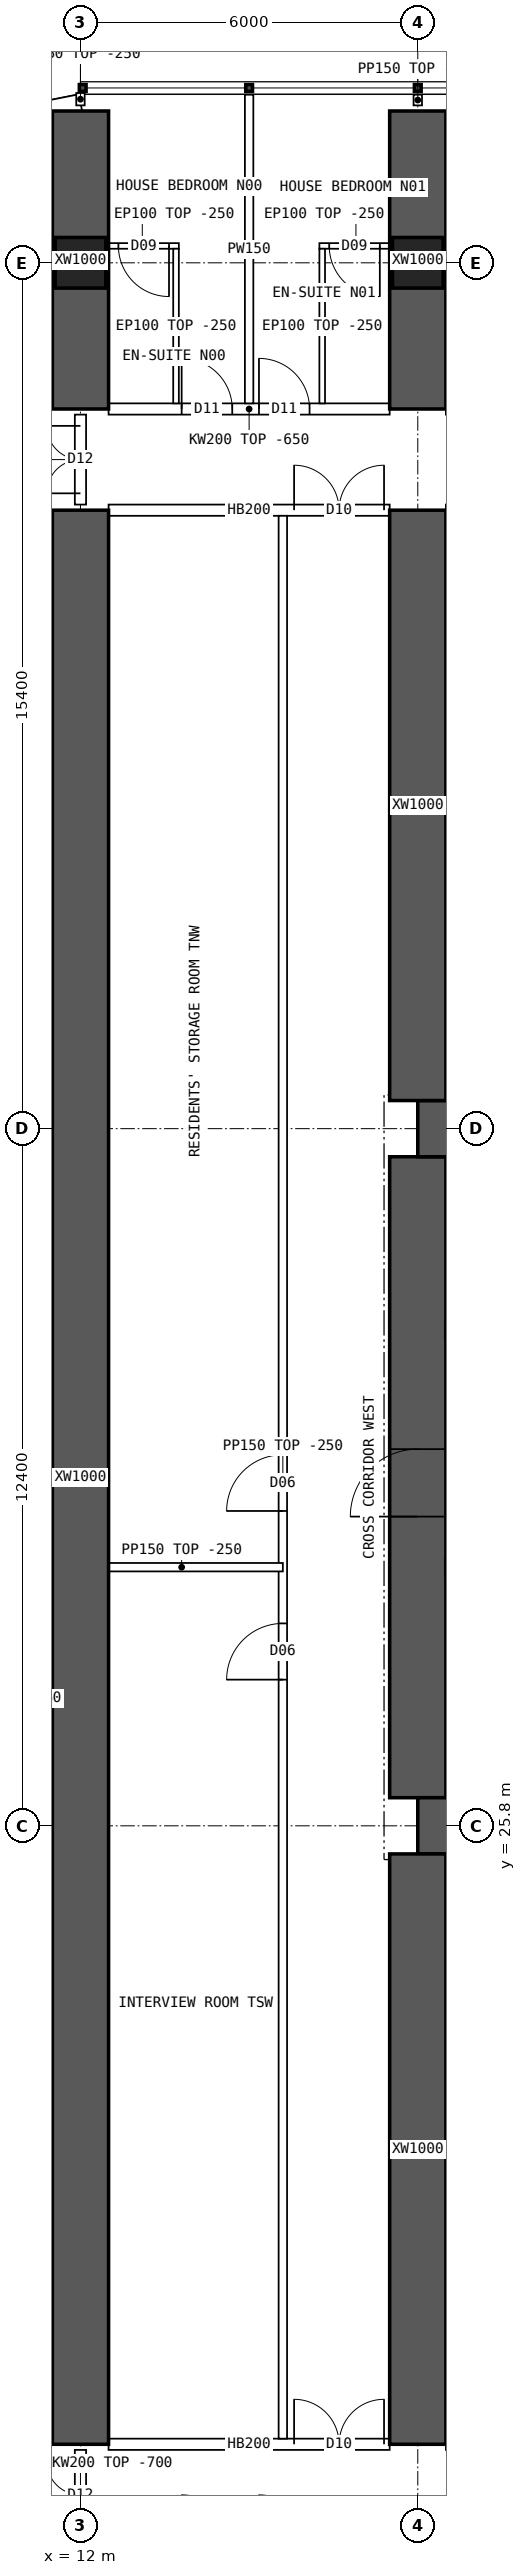
"""IFC4 building model, lengths in metres.
Left out: names, types, materials, properties, quantities, classifications, styles, units other than length and angle.
Written with IfcOpenShell. Run it as: python <this file> out.ifc"""

import sys

from ifc_helpers import new_model, si_unit, direction, frame, frame_2d, origin, origin_2d, place, context, subcontext, project, spatial, polyline, rectangle, hollow_rectangle, outline, extrude, element, fill, save


model = new_model("IFC4")
c1 = context("Model", 3, precision=1e-05, world=origin(), true_north=direction((0.0, 1.0)))
c2 = subcontext(c1, "Body", "Model", "MODEL_VIEW")
j1 = project(units=[si_unit("LENGTHUNIT", "METRE"), si_unit("PLANEANGLEUNIT", "RADIAN")], contexts=[c1])
p1 = place(None, origin())
s1 = spatial("IfcSite", under=j1, at=p1, CompositionType="ELEMENT")
p2 = place(p1, origin())
s2 = spatial("IfcBuilding", under=s1, at=p2, CompositionType="ELEMENT")
p3 = place(p2, frame((0.0, 0.0, 46.45)))
s3 = spatial("IfcBuildingStorey", under=s2, at=p3, CompositionType="ELEMENT", Elevation=46.45)
for number, where, z_axis, x_axis in (
    (1, (12.0, 53.6, 0.0), (0.0, 0.0, 1.0), (1.0, 0.0, 0.0)),
    (2, (18.0, 53.6, 0.0), (0.0, 0.0, 1.0), (1.0, 0.0, 0.0)),
):
    element("IfcColumn", number, at=place(p3, frame(where, z_axis=z_axis, x_axis=x_axis)), inside=s3, PredefinedType="COLUMN", context=c2, shape_type="SweptSolid", body=[
        extrude(hollow_rectangle(XDim=0.9, YDim=0.9, WallThickness=0.09, at=origin_2d()), origin(), (0.0, 0.0, 1.0), 3.75),
    ])
for number, where, z_axis, x_axis in (
    (3, (18.0, 25.8, 0.0), (0.0, 0.0, 1.0), (1.0, 0.0, 0.0)),
    (4, (18.0, 38.2, 0.0), (0.0, 0.0, 1.0), (1.0, 0.0, 0.0)),
):
    element("IfcWall", number, at=place(p3, frame(where, z_axis=z_axis, x_axis=x_axis)), inside=s3, PredefinedType="SHEAR", context=c2, shape_type="SweptSolid", body=[
        extrude(rectangle(XDim=48.0, YDim=1.0, at=frame_2d((24.0, 0.0))), origin(), (0.0, 0.0, 1.0), 3.75),
    ])
p4 = place(p3, frame((18.0, 26.3, 0.0), z_axis=(0.0, 0.0, 1.0), x_axis=(0.0, 1.0, 0.0)))
e5 = element("IfcWall", 5, at=p4, inside=s3, PredefinedType="SHEAR", context=c2, shape_type="SweptSolid", body=[
    extrude(rectangle(XDim=11.4, YDim=1.0, at=frame_2d((5.7, 0.0))), origin(), (0.0, 0.0, 1.0), 3.75),
])
p5 = place(p4, frame((5.0, 0.0, 0.0)))
e6 = element("IfcOpeningElement", 6, at=p5, cuts=e5, PredefinedType="OPENING", context=c2, shape_type="SweptSolid", body=[
    extrude(rectangle(XDim=1.2, YDim=2.1, at=frame_2d((0.6, 1.05))), frame((0.0, 0.51, 0.0), z_axis=(0.0, -1.0, 0.0), x_axis=(1.0, 0.0, 0.0)), (0.0, 0.0, 1.0), 1.02),
])
p6 = place(p3, frame((12.0, 51.0, 0.0), z_axis=(0.0, 0.0, 1.0), x_axis=(0.0, 1.0, 0.0)))
e7 = element("IfcWall", 7, at=p6, inside=s3, PredefinedType="SHEAR", context=c2, shape_type="SweptSolid", body=[
    extrude(rectangle(XDim=5.3, YDim=1.0, at=frame_2d((2.65, 0.0))), origin(), (0.0, 0.0, 1.0), 3.75),
])
p7 = place(p3, frame((12.0, 14.8, 0.0), z_axis=(0.0, 0.0, 1.0), x_axis=(0.0, 1.0, 0.0)))
e8 = element("IfcWall", 8, at=p7, inside=s3, PredefinedType="SHEAR", context=c2, shape_type="SweptSolid", body=[
    extrude(rectangle(XDim=34.4, YDim=1.0, at=frame_2d((17.2, 0.0))), origin(), (0.0, 0.0, 1.0), 3.75),
])
p8 = place(p3, frame((18.0, 51.0, 0.0), z_axis=(0.0, 0.0, 1.0), x_axis=(0.0, 1.0, 0.0)))
e9 = element("IfcWall", 9, at=p8, inside=s3, PredefinedType="SHEAR", context=c2, shape_type="SweptSolid", body=[
    extrude(rectangle(XDim=5.3, YDim=1.0, at=frame_2d((2.65, 0.0))), origin(), (0.0, 0.0, 1.0), 3.75),
])
for number, where, z_axis, x_axis in (
    (10, (18.0, 14.8, 0.0), (0.0, 0.0, 1.0), (0.0, 1.0, 0.0)),
    (11, (18.0, 38.7, 0.0), (0.0, 0.0, 1.0), (0.0, 1.0, 0.0)),
):
    element("IfcWall", number, at=place(p3, frame(where, z_axis=z_axis, x_axis=x_axis)), inside=s3, PredefinedType="SHEAR", context=c2, shape_type="SweptSolid", body=[
        extrude(rectangle(XDim=10.5, YDim=1.0, at=frame_2d((5.25, 0.0))), origin(), (0.0, 0.0, 1.0), 3.75),
    ])
p9 = place(p3, frame((12.0, 56.45, 0.0), z_axis=(0.0, 0.0, 1.0), x_axis=(-0.980787251524, -0.195080412259, 0.0)))
e12 = element("IfcWall", 12, at=p9, inside=s3, PredefinedType="SOLIDWALL", context=c2, shape_type="SweptSolid", body=[
    extrude(outline(polyline([(-0.03, -0.15), (3.249, -0.15), (3.189, 0.15), (0.03, 0.15), (-0.03, -0.15)])), origin(), (0.0, 0.0, 1.0), 3.5),
])
p10 = place(p9, frame((0.909, 0.0, 0.9)))
e13 = element("IfcOpeningElement", 13, at=p10, cuts=e12, PredefinedType="OPENING", context=c2, shape_type="SweptSolid", body=[
    extrude(rectangle(XDim=1.4, YDim=1.8, at=frame_2d((0.7, 0.9))), frame((0.0, 0.16, 0.0), z_axis=(0.0, -1.0, 0.0), x_axis=(1.0, 0.0, 0.0)), (0.0, 0.0, 1.0), 0.32),
])
p11 = place(p3, frame((12.5, 14.8, 0.0), z_axis=(0.0, 0.0, 1.0), x_axis=(1.0, 0.0, 0.0)))
e14 = element("IfcWall", 14, at=p11, inside=s3, PredefinedType="SOLIDWALL", context=c2, shape_type="SweptSolid", body=[
    extrude(rectangle(XDim=5.0, YDim=0.2, at=frame_2d((2.5, 0.0))), origin(), (0.0, 0.0, 1.0), 3.5),
])
p12 = place(p11, frame((3.3, 0.0, 0.0)))
e15 = element("IfcOpeningElement", 15, at=p12, cuts=e14, PredefinedType="OPENING", context=c2, shape_type="SweptSolid", body=[
    extrude(rectangle(XDim=1.6, YDim=2.1, at=frame_2d((0.8, 1.05))), frame((0.0, 0.11, 0.0), z_axis=(0.0, -1.0, 0.0), x_axis=(1.0, 0.0, 0.0)), (0.0, 0.0, 1.0), 0.22),
])
p13 = place(p3, frame((12.5, 51.0, 0.0), z_axis=(0.0, 0.0, 1.0), x_axis=(1.0, 0.0, 0.0)))
e16 = element("IfcWall", 16, at=p13, inside=s3, PredefinedType="SOLIDWALL", context=c2, shape_type="SweptSolid", body=[
    extrude(outline(polyline([(0.0, 0.0), (5.0, 0.0), (5.0, 3.1), (0.0, 3.1), (0.0, 0.0)])), frame((0.0, 0.1, 0.0), z_axis=(0.0, -1.0, 0.0), x_axis=(1.0, 0.0, 0.0)), (0.0, 0.0, 1.0), 0.2),
])
p14 = place(p13, frame((1.3, 0.0, 0.0)))
e17 = element("IfcOpeningElement", 17, at=p14, cuts=e16, PredefinedType="OPENING", context=c2, shape_type="SweptSolid", body=[
    extrude(rectangle(XDim=0.9, YDim=2.1, at=frame_2d((0.45, 1.05))), frame((0.0, 0.11, 0.0), z_axis=(0.0, -1.0, 0.0), x_axis=(1.0, 0.0, 0.0)), (0.0, 0.0, 1.0), 0.22),
])
p15 = place(p13, frame((2.675, 0.0, 0.0)))
e18 = element("IfcOpeningElement", 18, at=p15, cuts=e16, PredefinedType="OPENING", context=c2, shape_type="SweptSolid", body=[
    extrude(rectangle(XDim=0.9, YDim=2.1, at=frame_2d((0.45, 1.05))), frame((0.0, 0.11, 0.0), z_axis=(0.0, -1.0, 0.0), x_axis=(1.0, 0.0, 0.0)), (0.0, 0.0, 1.0), 0.22),
])
p16 = place(p3, frame((12.5, 49.2, 0.0), z_axis=(0.0, 0.0, 1.0), x_axis=(1.0, 0.0, 0.0)))
e19 = element("IfcWall", 19, at=p16, inside=s3, PredefinedType="SOLIDWALL", context=c2, shape_type="SweptSolid", body=[
    extrude(rectangle(XDim=5.0, YDim=0.2, at=frame_2d((2.5, 0.0))), origin(), (0.0, 0.0, 1.0), 3.5),
])
p17 = place(p16, frame((3.3, 0.0, 0.0)))
e20 = element("IfcOpeningElement", 20, at=p17, cuts=e19, PredefinedType="OPENING", context=c2, shape_type="SweptSolid", body=[
    extrude(rectangle(XDim=1.6, YDim=2.1, at=frame_2d((0.8, 1.05))), frame((0.0, 0.11, 0.0), z_axis=(0.0, -1.0, 0.0), x_axis=(1.0, 0.0, 0.0)), (0.0, 0.0, 1.0), 0.22),
])
p18 = place(p3, frame((15.0, 56.59, 0.0), z_axis=(0.0, 0.0, 1.0), x_axis=(0.0, -1.0, 0.0)))
e21 = element("IfcWall", 21, at=p18, inside=s3, PredefinedType="PARTITIONING", context=c2, shape_type="SweptSolid", body=[
    extrude(outline(polyline([(0.0, 0.0), (5.49, 0.0), (5.49, 3.1), (5.442, 3.1), (5.44, 3.5), (3.192, 3.5), (3.19, 3.1), (2.792, 3.1), (2.79, 3.5), (0.0, 3.5), (0.0, 0.0)])), frame((0.0, 0.075, 0.0), z_axis=(0.0, -1.0, 0.0), x_axis=(1.0, 0.0, 0.0)), (0.0, 0.0, 1.0), 0.15),
])
p19 = place(p3, frame((12.45, 53.9, 0.0), z_axis=(0.0, 0.0, 1.0), x_axis=(1.0, 0.0, 0.0)))
e22 = element("IfcWall", 22, at=p19, inside=s3, PredefinedType="PARTITIONING", context=c2, shape_type="SweptSolid", body=[
    extrude(rectangle(XDim=1.3, YDim=0.1, at=frame_2d((0.65, 0.0))), origin(), (0.0, 0.0, 1.0), 3.5),
])
p20 = place(p19, frame((0.225, 0.0, 0.0)))
e23 = element("IfcOpeningElement", 23, at=p20, cuts=e22, PredefinedType="OPENING", context=c2, shape_type="SweptSolid", body=[
    extrude(rectangle(XDim=0.9, YDim=2.1, at=frame_2d((0.45, 1.05))), frame((0.0, 0.06, 0.0), z_axis=(0.0, -1.0, 0.0), x_axis=(1.0, 0.0, 0.0)), (0.0, 0.0, 1.0), 0.12),
])
p21 = place(p3, frame((13.7, 53.85, 0.0), z_axis=(0.0, 0.0, 1.0), x_axis=(0.0, -1.0, 0.0)))
e24 = element("IfcWall", 24, at=p21, inside=s3, PredefinedType="PARTITIONING", context=c2, shape_type="SweptSolid", body=[
    extrude(outline(polyline([(0.0, 0.0), (2.75, 0.0), (2.75, 3.1), (2.702, 3.1), (2.7, 3.5), (0.452, 3.5), (0.45, 3.1), (0.0, 3.1), (0.0, 0.0)])), frame((0.0, 0.05, 0.0), z_axis=(0.0, -1.0, 0.0), x_axis=(1.0, 0.0, 0.0)), (0.0, 0.0, 1.0), 0.1),
])
p22 = place(p3, frame((16.25, 53.9, 0.0), z_axis=(0.0, 0.0, 1.0), x_axis=(1.0, 0.0, 0.0)))
e25 = element("IfcWall", 25, at=p22, inside=s3, PredefinedType="PARTITIONING", context=c2, shape_type="SweptSolid", body=[
    extrude(rectangle(XDim=1.3, YDim=0.1, at=frame_2d((0.65, 0.0))), origin(), (0.0, 0.0, 1.0), 3.5),
])
p23 = place(p22, frame((0.175, 0.0, 0.0)))
e26 = element("IfcOpeningElement", 26, at=p23, cuts=e25, PredefinedType="OPENING", context=c2, shape_type="SweptSolid", body=[
    extrude(rectangle(XDim=0.9, YDim=2.1, at=frame_2d((0.45, 1.05))), frame((0.0, 0.06, 0.0), z_axis=(0.0, -1.0, 0.0), x_axis=(1.0, 0.0, 0.0)), (0.0, 0.0, 1.0), 0.12),
])
p24 = place(p3, frame((16.3, 53.85, 0.0), z_axis=(0.0, 0.0, 1.0), x_axis=(0.0, -1.0, 0.0)))
e27 = element("IfcWall", 27, at=p24, inside=s3, PredefinedType="PARTITIONING", context=c2, shape_type="SweptSolid", body=[
    extrude(outline(polyline([(0.0, 0.0), (2.75, 0.0), (2.75, 3.1), (2.702, 3.1), (2.7, 3.5), (0.452, 3.5), (0.45, 3.1), (0.0, 3.1), (0.0, 0.0)])), frame((0.0, 0.05, 0.0), z_axis=(0.0, -1.0, 0.0), x_axis=(1.0, 0.0, 0.0)), (0.0, 0.0, 1.0), 0.1),
])
p25 = place(p3, frame((15.6, 14.9, 0.0), z_axis=(0.0, 0.0, 1.0), x_axis=(0.0, 1.0, 0.0)))
e28 = element("IfcWall", 28, at=p25, inside=s3, PredefinedType="PARTITIONING", context=c2, shape_type="SweptSolid", body=[
    extrude(rectangle(XDim=34.2, YDim=0.15, at=frame_2d((17.1, 0.0))), origin(), (0.0, 0.0, 1.0), 3.5),
])
p26 = place(p25, frame((13.5, 0.0, 0.0)))
e29 = element("IfcOpeningElement", 29, at=p26, cuts=e28, PredefinedType="OPENING", context=c2, shape_type="SweptSolid", body=[
    extrude(rectangle(XDim=1.0, YDim=2.1, at=frame_2d((0.5, 1.05))), frame((0.0, 0.085, 0.0), z_axis=(0.0, -1.0, 0.0), x_axis=(1.0, 0.0, 0.0)), (0.0, 0.0, 1.0), 0.17),
])
p27 = place(p25, frame((16.5, 0.0, 0.0)))
e30 = element("IfcOpeningElement", 30, at=p27, cuts=e28, PredefinedType="OPENING", context=c2, shape_type="SweptSolid", body=[
    extrude(rectangle(XDim=1.0, YDim=2.1, at=frame_2d((0.5, 1.05))), frame((0.0, 0.085, 0.0), z_axis=(0.0, -1.0, 0.0), x_axis=(1.0, 0.0, 0.0)), (0.0, 0.0, 1.0), 0.17),
])
p28 = place(p3, frame((12.0, 30.4, 0.0), z_axis=(0.0, 0.0, 1.0), x_axis=(1.0, 0.0, 0.0)))
e31 = element("IfcWall", 31, at=p28, inside=s3, PredefinedType="PARTITIONING", context=c2, shape_type="SweptSolid", body=[
    extrude(rectangle(XDim=3.6, YDim=0.15, at=frame_2d((1.8, 0.0))), origin(), (0.0, 0.0, 1.0), 3.5),
])
p29 = place(p3, frame((3.905, 30.85, 0.0), z_axis=(0.0, 0.0, 1.0), x_axis=(1.0, 0.0, 0.0)))
e32 = element("IfcWall", 32, at=p29, inside=s3, PredefinedType="PARTITIONING", context=c2, shape_type="SweptSolid", body=[
    extrude(outline(polyline([(0.0, 0.0), (8.02, 0.0), (8.02, 3.5), (2.397, 3.5), (2.395, 3.05), (1.797, 3.05), (1.795, 3.5), (0.0, 3.5), (0.0, 0.0)])), frame((0.0, 0.075, 0.0), z_axis=(0.0, -1.0, 0.0), x_axis=(1.0, 0.0, 0.0)), (0.0, 0.0, 1.0), 0.15),
])
p30 = place(p3, frame((12.0, 13.1, 0.0), z_axis=(0.0, 0.0, 1.0), x_axis=(0.0, 1.0, 0.0)))
e33 = element("IfcWall", 33, at=p30, inside=s3, PredefinedType="SOLIDWALL", context=c2, shape_type="SweptSolid", body=[
    extrude(outline(polyline([(0.0, 0.0), (1.6, 0.0), (1.6, 3.05), (0.0, 3.05), (0.0, 0.0)])), frame((0.0, 0.1, 0.0), z_axis=(0.0, -1.0, 0.0), x_axis=(1.0, 0.0, 0.0)), (0.0, 0.0, 1.0), 0.2),
])
p31 = place(p30, frame((0.2, 0.0, 0.0)))
e34 = element("IfcOpeningElement", 34, at=p31, cuts=e33, PredefinedType="OPENING", context=c2, shape_type="SweptSolid", body=[
    extrude(rectangle(XDim=1.2, YDim=2.1, at=frame_2d((0.6, 1.05))), frame((0.0, 0.11, 0.0), z_axis=(0.0, -1.0, 0.0), x_axis=(1.0, 0.0, 0.0)), (0.0, 0.0, 1.0), 0.22),
])
p32 = place(p3, frame((12.0, 49.3, 0.0), z_axis=(0.0, 0.0, 1.0), x_axis=(0.0, 1.0, 0.0)))
e35 = element("IfcWall", 35, at=p32, inside=s3, PredefinedType="SOLIDWALL", context=c2, shape_type="SweptSolid", body=[
    extrude(outline(polyline([(0.0, 0.0), (1.6, 0.0), (1.6, 3.05), (0.0, 3.05), (0.0, 0.0)])), frame((0.0, 0.1, 0.0), z_axis=(0.0, -1.0, 0.0), x_axis=(1.0, 0.0, 0.0)), (0.0, 0.0, 1.0), 0.2),
])
p33 = place(p32, frame((0.2, 0.0, 0.0)))
e36 = element("IfcOpeningElement", 36, at=p33, cuts=e35, PredefinedType="OPENING", context=c2, shape_type="SweptSolid", body=[
    extrude(rectangle(XDim=1.2, YDim=2.1, at=frame_2d((0.6, 1.05))), frame((0.0, 0.11, 0.0), z_axis=(0.0, -1.0, 0.0), x_axis=(1.0, 0.0, 0.0)), (0.0, 0.0, 1.0), 0.22),
])
p34 = place(p3, frame((12.0, 56.4, 0.0), z_axis=(0.0, 0.0, 1.0), x_axis=(0.0, 1.0, 0.0)))
e37 = element("IfcWall", 37, at=p34, inside=s3, PredefinedType="PARTITIONING", context=c2, shape_type="SweptSolid", body=[
    extrude(rectangle(XDim=0.22, YDim=0.15, at=frame_2d((0.11, 0.0))), origin(), (0.0, 0.0, 1.0), 3.5),
])
p35 = place(p3, frame((18.0, 56.4, 0.0), z_axis=(0.0, 0.0, 1.0), x_axis=(0.0, 1.0, 0.0)))
e38 = element("IfcWall", 38, at=p35, inside=s3, PredefinedType="PARTITIONING", context=c2, shape_type="SweptSolid", body=[
    extrude(rectangle(XDim=0.19, YDim=0.15, at=frame_2d((0.095, 0.0))), origin(), (0.0, 0.0, 1.0), 3.5),
])
p36 = place(p5, origin())
e39 = element("IfcDoor", 39, at=p36, inside=s3, OperationType="SINGLE_SWING_LEFT", PredefinedType="DOOR", context=c2, shape_type="SweptSolid", body=[
    extrude(rectangle(XDim=1.2, YDim=2.1, at=frame_2d((0.6, 1.05))), frame((0.0, 0.025, 0.0), z_axis=(0.0, -1.0, 0.0), x_axis=(1.0, 0.0, 0.0)), (0.0, 0.0, 1.0), 0.05),
])
fill(e6, e39)
p37 = place(p12, origin())
e40 = element("IfcDoor", 40, at=p37, inside=s3, OperationType="DOUBLE_DOOR_SINGLE_SWING", PredefinedType="DOOR", context=c2, shape_type="SweptSolid", body=[
    extrude(rectangle(XDim=1.6, YDim=2.1, at=frame_2d((0.8, 1.05))), frame((0.0, 0.025, 0.0), z_axis=(0.0, -1.0, 0.0), x_axis=(1.0, 0.0, 0.0)), (0.0, 0.0, 1.0), 0.05),
])
fill(e15, e40)
p38 = place(p17, origin())
e41 = element("IfcDoor", 41, at=p38, inside=s3, OperationType="DOUBLE_DOOR_SINGLE_SWING", PredefinedType="DOOR", context=c2, shape_type="SweptSolid", body=[
    extrude(rectangle(XDim=1.6, YDim=2.1, at=frame_2d((0.8, 1.05))), frame((0.0, 0.025, 0.0), z_axis=(0.0, -1.0, 0.0), x_axis=(1.0, 0.0, 0.0)), (0.0, 0.0, 1.0), 0.05),
])
fill(e20, e41)
p39 = place(p20, origin())
e42 = element("IfcDoor", 42, at=p39, inside=s3, OperationType="SINGLE_SWING_RIGHT", PredefinedType="DOOR", context=c2, shape_type="SweptSolid", body=[
    extrude(rectangle(XDim=0.9, YDim=2.1, at=frame_2d((0.45, 1.05))), frame((0.0, 0.025, 0.0), z_axis=(0.0, -1.0, 0.0), x_axis=(1.0, 0.0, 0.0)), (0.0, 0.0, 1.0), 0.05),
])
fill(e23, e42)
p40 = place(p14, origin())
e43 = element("IfcDoor", 43, at=p40, inside=s3, OperationType="SINGLE_SWING_LEFT", PredefinedType="DOOR", context=c2, shape_type="SweptSolid", body=[
    extrude(rectangle(XDim=0.9, YDim=2.1, at=frame_2d((0.45, 1.05))), frame((0.0, 0.025, 0.0), z_axis=(0.0, -1.0, 0.0), x_axis=(1.0, 0.0, 0.0)), (0.0, 0.0, 1.0), 0.05),
])
fill(e17, e43)
p41 = place(p23, origin())
e44 = element("IfcDoor", 44, at=p41, inside=s3, OperationType="SINGLE_SWING_RIGHT", PredefinedType="DOOR", context=c2, shape_type="SweptSolid", body=[
    extrude(rectangle(XDim=0.9, YDim=2.1, at=frame_2d((0.45, 1.05))), frame((0.0, 0.025, 0.0), z_axis=(0.0, -1.0, 0.0), x_axis=(1.0, 0.0, 0.0)), (0.0, 0.0, 1.0), 0.05),
])
fill(e26, e44)
p42 = place(p15, origin())
e45 = element("IfcDoor", 45, at=p42, inside=s3, OperationType="SINGLE_SWING_LEFT", PredefinedType="DOOR", context=c2, shape_type="SweptSolid", body=[
    extrude(rectangle(XDim=0.9, YDim=2.1, at=frame_2d((0.45, 1.05))), frame((0.0, 0.025, 0.0), z_axis=(0.0, -1.0, 0.0), x_axis=(1.0, 0.0, 0.0)), (0.0, 0.0, 1.0), 0.05),
])
fill(e18, e45)
p43 = place(p26, origin())
e46 = element("IfcDoor", 46, at=p43, inside=s3, OperationType="SINGLE_SWING_LEFT", PredefinedType="DOOR", context=c2, shape_type="SweptSolid", body=[
    extrude(rectangle(XDim=1.0, YDim=2.1, at=frame_2d((0.5, 1.05))), frame((0.0, 0.025, 0.0), z_axis=(0.0, -1.0, 0.0), x_axis=(1.0, 0.0, 0.0)), (0.0, 0.0, 1.0), 0.05),
])
fill(e29, e46)
p44 = place(p27, origin())
e47 = element("IfcDoor", 47, at=p44, inside=s3, OperationType="SINGLE_SWING_LEFT", PredefinedType="DOOR", context=c2, shape_type="SweptSolid", body=[
    extrude(rectangle(XDim=1.0, YDim=2.1, at=frame_2d((0.5, 1.05))), frame((0.0, 0.025, 0.0), z_axis=(0.0, -1.0, 0.0), x_axis=(1.0, 0.0, 0.0)), (0.0, 0.0, 1.0), 0.05),
])
fill(e30, e47)
p45 = place(p31, origin())
e48 = element("IfcDoor", 48, at=p45, inside=s3, OperationType="DOUBLE_DOOR_SINGLE_SWING", PredefinedType="DOOR", context=c2, shape_type="SweptSolid", body=[
    extrude(rectangle(XDim=1.2, YDim=2.1, at=frame_2d((0.6, 1.05))), frame((0.0, 0.025, 0.0), z_axis=(0.0, -1.0, 0.0), x_axis=(1.0, 0.0, 0.0)), (0.0, 0.0, 1.0), 0.05),
])
fill(e34, e48)
p46 = place(p33, origin())
e49 = element("IfcDoor", 49, at=p46, inside=s3, OperationType="DOUBLE_DOOR_SINGLE_SWING", PredefinedType="DOOR", context=c2, shape_type="SweptSolid", body=[
    extrude(rectangle(XDim=1.2, YDim=2.1, at=frame_2d((0.6, 1.05))), frame((0.0, 0.025, 0.0), z_axis=(0.0, -1.0, 0.0), x_axis=(1.0, 0.0, 0.0)), (0.0, 0.0, 1.0), 0.05),
])
fill(e36, e49)
save(model, sys.argv[1])
